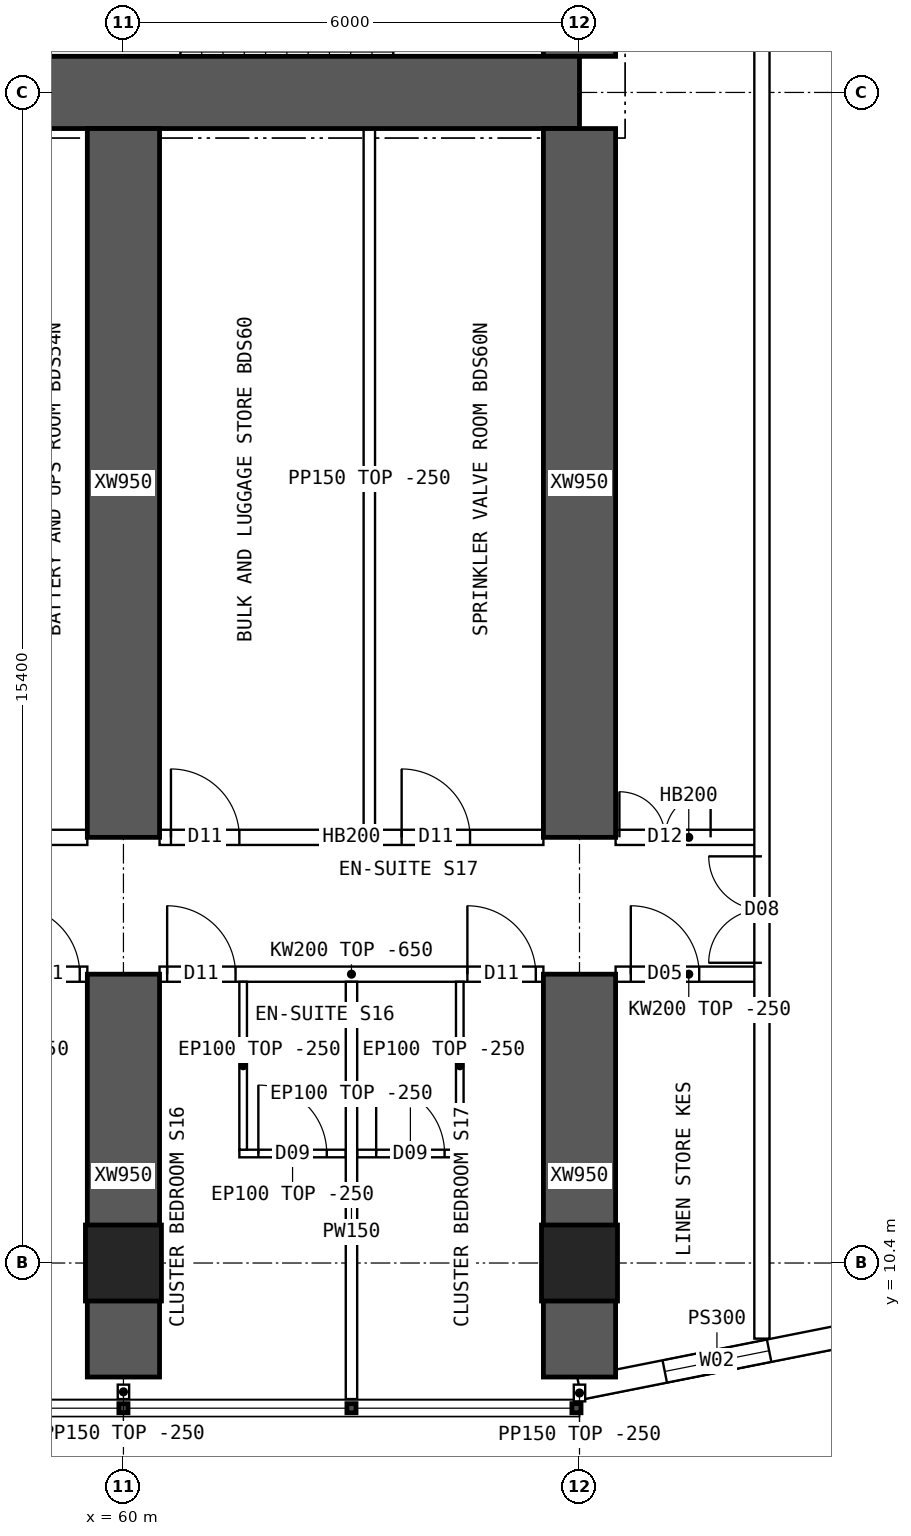
"""IFC4 building model, lengths in metres.
Left out: names, types, materials, properties, quantities, classifications, styles, units other than length and angle.
Written with IfcOpenShell. Run it as: python <this file> out.ifc"""

import sys

from ifc_helpers import new_model, si_unit, direction, frame, frame_2d, origin, origin_2d, place, context, subcontext, project, spatial, polyline, rectangle, hollow_rectangle, outline, extrude, element, fill, save


model = new_model("IFC4")
c1 = context("Model", 3, precision=1e-05, world=origin(), true_north=direction((0.0, 1.0)))
c2 = subcontext(c1, "Body", "Model", "MODEL_VIEW")
j1 = project(units=[si_unit("LENGTHUNIT", "METRE"), si_unit("PLANEANGLEUNIT", "RADIAN")], contexts=[c1])
p1 = place(None, origin())
s1 = spatial("IfcSite", under=j1, at=p1, CompositionType="ELEMENT")
p2 = place(p1, origin())
s2 = spatial("IfcBuilding", under=s1, at=p2, CompositionType="ELEMENT")
p3 = place(p2, frame((0.0, 0.0, 99.4)))
s3 = spatial("IfcBuildingStorey", under=s2, at=p3, CompositionType="ELEMENT", Elevation=99.4)
for number, where, z_axis, x_axis in (
    (1, (60.0, 10.4, 0.0), (0.0, 0.0, 1.0), (1.0, 0.0, 0.0)),
    (2, (66.0, 10.4, 0.0), (0.0, 0.0, 1.0), (1.0, 0.0, 0.0)),
):
    element("IfcColumn", number, at=place(p3, frame(where, z_axis=z_axis, x_axis=x_axis)), inside=s3, PredefinedType="COLUMN", context=c2, shape_type="SweptSolid", body=[
        extrude(hollow_rectangle(XDim=1.0, YDim=1.0, WallThickness=0.1, at=origin_2d()), origin(), (0.0, 0.0, 1.0), 3.75),
    ])
p4 = place(p3, frame((18.0, 25.8, 0.0), z_axis=(0.0, 0.0, 1.0), x_axis=(1.0, 0.0, 0.0)))
e3 = element("IfcWall", 3, at=p4, inside=s3, PredefinedType="SHEAR", context=c2, shape_type="SweptSolid", body=[
    extrude(rectangle(XDim=48.0, YDim=0.95, at=frame_2d((24.0, 0.0))), origin(), (0.0, 0.0, 1.0), 3.75),
])
p5 = place(p3, frame((66.0, 26.275, 0.0), z_axis=(0.0, 0.0, 1.0), x_axis=(0.0, 1.0, 0.0)))
e4 = element("IfcWall", 4, at=p5, inside=s3, PredefinedType="SHEAR", context=c2, shape_type="SweptSolid", body=[
    extrude(rectangle(XDim=11.45, YDim=0.95, at=frame_2d((5.725, 0.0))), origin(), (0.0, 0.0, 1.0), 3.75),
])
p6 = place(p5, frame((5.025, 0.0, 0.0)))
e5 = element("IfcOpeningElement", 5, at=p6, cuts=e4, PredefinedType="OPENING", context=c2, shape_type="SweptSolid", body=[
    extrude(rectangle(XDim=1.2, YDim=2.1, at=frame_2d((0.6, 1.05))), frame((0.0, 0.485, 0.0), z_axis=(0.0, -1.0, 0.0), x_axis=(1.0, 0.0, 0.0)), (0.0, 0.0, 1.0), 0.97),
])
p7 = place(p3, frame((60.0, 8.9, 0.0), z_axis=(0.0, 0.0, 1.0), x_axis=(0.0, 1.0, 0.0)))
e6 = element("IfcWall", 6, at=p7, inside=s3, PredefinedType="SHEAR", context=c2, shape_type="SweptSolid", body=[
    extrude(rectangle(XDim=5.3, YDim=0.95, at=frame_2d((2.65, 0.0))), origin(), (0.0, 0.0, 1.0), 3.75),
])
p8 = place(p3, frame((60.0, 16.0, 0.0), z_axis=(0.0, 0.0, 1.0), x_axis=(0.0, 1.0, 0.0)))
e7 = element("IfcWall", 7, at=p8, inside=s3, PredefinedType="SHEAR", context=c2, shape_type="SweptSolid", body=[
    extrude(rectangle(XDim=9.325, YDim=0.95, at=frame_2d((4.663, 0.0))), origin(), (0.0, 0.0, 1.0), 3.75),
])
p9 = place(p3, frame((66.0, 8.9, 0.0), z_axis=(0.0, 0.0, 1.0), x_axis=(0.0, 1.0, 0.0)))
e8 = element("IfcWall", 8, at=p9, inside=s3, PredefinedType="SHEAR", context=c2, shape_type="SweptSolid", body=[
    extrude(rectangle(XDim=5.3, YDim=0.95, at=frame_2d((2.65, 0.0))), origin(), (0.0, 0.0, 1.0), 3.75),
])
p10 = place(p3, frame((66.0, 16.0, 0.0), z_axis=(0.0, 0.0, 1.0), x_axis=(0.0, 1.0, 0.0)))
e9 = element("IfcWall", 9, at=p10, inside=s3, PredefinedType="SHEAR", context=c2, shape_type="SweptSolid", body=[
    extrude(rectangle(XDim=9.325, YDim=0.95, at=frame_2d((4.663, 0.0))), origin(), (0.0, 0.0, 1.0), 3.75),
])
p11 = place(p3, frame((66.0, 8.75, 0.0), z_axis=(0.0, 0.0, 1.0), x_axis=(0.980791473772, 0.195059183267, 0.0)))
e10 = element("IfcWall", 10, at=p11, inside=s3, PredefinedType="SOLIDWALL", context=c2, shape_type="SweptSolid", body=[
    extrude(outline(polyline([(-0.03, -0.15), (3.717, -0.15), (3.657, 0.15), (0.03, 0.15), (-0.03, -0.15)])), origin(), (0.0, 0.0, 1.0), 3.5),
])
p12 = place(p11, frame((1.144, 0.0, 0.9)))
e11 = element("IfcOpeningElement", 11, at=p12, cuts=e10, PredefinedType="OPENING", context=c2, shape_type="SweptSolid", body=[
    extrude(rectangle(XDim=1.4, YDim=1.8, at=frame_2d((0.7, 0.9))), frame((0.0, 0.16, 0.0), z_axis=(0.0, -1.0, 0.0), x_axis=(1.0, 0.0, 0.0)), (0.0, 0.0, 1.0), 0.32),
])
p13 = place(p3, frame((54.475, 14.2, 0.0), z_axis=(0.0, 0.0, 1.0), x_axis=(1.0, 0.0, 0.0)))
e12 = element("IfcWall", 12, at=p13, inside=s3, PredefinedType="SOLIDWALL", context=c2, shape_type="SweptSolid", body=[
    extrude(outline(polyline([(0.0, 0.0), (5.05, 0.0), (5.05, 3.1), (0.0, 3.1), (0.0, 0.0)])), frame((0.0, 0.1, 0.0), z_axis=(0.0, -1.0, 0.0), x_axis=(1.0, 0.0, 0.0)), (0.0, 0.0, 1.0), 0.2),
])
p14 = place(p13, frame((0.1, 0.0, 0.0)))
e13 = element("IfcOpeningElement", 13, at=p14, cuts=e12, PredefinedType="OPENING", context=c2, shape_type="SweptSolid", body=[
    extrude(rectangle(XDim=0.9, YDim=2.1, at=frame_2d((0.45, 1.05))), frame((0.0, 0.11, 0.0), z_axis=(0.0, -1.0, 0.0), x_axis=(1.0, 0.0, 0.0)), (0.0, 0.0, 1.0), 0.22),
])
p15 = place(p13, frame((4.05, 0.0, 0.0)))
e14 = element("IfcOpeningElement", 14, at=p15, cuts=e12, PredefinedType="OPENING", context=c2, shape_type="SweptSolid", body=[
    extrude(rectangle(XDim=0.9, YDim=2.1, at=frame_2d((0.45, 1.05))), frame((0.0, 0.11, 0.0), z_axis=(0.0, -1.0, 0.0), x_axis=(1.0, 0.0, 0.0)), (0.0, 0.0, 1.0), 0.22),
])
p16 = place(p3, frame((54.475, 16.0, 0.0), z_axis=(0.0, 0.0, 1.0), x_axis=(1.0, 0.0, 0.0)))
e15 = element("IfcWall", 15, at=p16, inside=s3, PredefinedType="SOLIDWALL", context=c2, shape_type="SweptSolid", body=[
    extrude(rectangle(XDim=5.05, YDim=0.2, at=frame_2d((2.525, 0.0))), origin(), (0.0, 0.0, 1.0), 3.5),
])
p17 = place(p16, frame((0.35, 0.0, 0.0)))
e16 = element("IfcOpeningElement", 16, at=p17, cuts=e15, PredefinedType="OPENING", context=c2, shape_type="SweptSolid", body=[
    extrude(rectangle(XDim=0.9, YDim=2.1, at=frame_2d((0.45, 1.05))), frame((0.0, 0.11, 0.0), z_axis=(0.0, -1.0, 0.0), x_axis=(1.0, 0.0, 0.0)), (0.0, 0.0, 1.0), 0.22),
])
p18 = place(p16, frame((3.565, 0.0, 0.0)))
e17 = element("IfcOpeningElement", 17, at=p18, cuts=e15, PredefinedType="OPENING", context=c2, shape_type="SweptSolid", body=[
    extrude(rectangle(XDim=0.9, YDim=2.1, at=frame_2d((0.45, 1.05))), frame((0.0, 0.11, 0.0), z_axis=(0.0, -1.0, 0.0), x_axis=(1.0, 0.0, 0.0)), (0.0, 0.0, 1.0), 0.22),
])
p19 = place(p3, frame((60.475, 14.2, 0.0), z_axis=(0.0, 0.0, 1.0), x_axis=(1.0, 0.0, 0.0)))
e18 = element("IfcWall", 18, at=p19, inside=s3, PredefinedType="SOLIDWALL", context=c2, shape_type="SweptSolid", body=[
    extrude(outline(polyline([(0.0, 0.0), (5.05, 0.0), (5.05, 3.1), (0.0, 3.1), (0.0, 0.0)])), frame((0.0, 0.1, 0.0), z_axis=(0.0, -1.0, 0.0), x_axis=(1.0, 0.0, 0.0)), (0.0, 0.0, 1.0), 0.2),
])
p20 = place(p19, frame((0.1, 0.0, 0.0)))
e19 = element("IfcOpeningElement", 19, at=p20, cuts=e18, PredefinedType="OPENING", context=c2, shape_type="SweptSolid", body=[
    extrude(rectangle(XDim=0.9, YDim=2.1, at=frame_2d((0.45, 1.05))), frame((0.0, 0.11, 0.0), z_axis=(0.0, -1.0, 0.0), x_axis=(1.0, 0.0, 0.0)), (0.0, 0.0, 1.0), 0.22),
])
p21 = place(p19, frame((4.05, 0.0, 0.0)))
e20 = element("IfcOpeningElement", 20, at=p21, cuts=e18, PredefinedType="OPENING", context=c2, shape_type="SweptSolid", body=[
    extrude(rectangle(XDim=0.9, YDim=2.1, at=frame_2d((0.45, 1.05))), frame((0.0, 0.11, 0.0), z_axis=(0.0, -1.0, 0.0), x_axis=(1.0, 0.0, 0.0)), (0.0, 0.0, 1.0), 0.22),
])
p22 = place(p3, frame((60.475, 16.0, 0.0), z_axis=(0.0, 0.0, 1.0), x_axis=(1.0, 0.0, 0.0)))
e21 = element("IfcWall", 21, at=p22, inside=s3, PredefinedType="SOLIDWALL", context=c2, shape_type="SweptSolid", body=[
    extrude(rectangle(XDim=5.05, YDim=0.2, at=frame_2d((2.525, 0.0))), origin(), (0.0, 0.0, 1.0), 3.5),
])
p23 = place(p22, frame((0.15, 0.0, 0.0)))
e22 = element("IfcOpeningElement", 22, at=p23, cuts=e21, PredefinedType="OPENING", context=c2, shape_type="SweptSolid", body=[
    extrude(rectangle(XDim=0.9, YDim=2.1, at=frame_2d((0.45, 1.05))), frame((0.0, 0.11, 0.0), z_axis=(0.0, -1.0, 0.0), x_axis=(1.0, 0.0, 0.0)), (0.0, 0.0, 1.0), 0.22),
])
p24 = place(p22, frame((3.185, 0.0, 0.0)))
e23 = element("IfcOpeningElement", 23, at=p24, cuts=e21, PredefinedType="OPENING", context=c2, shape_type="SweptSolid", body=[
    extrude(rectangle(XDim=0.9, YDim=2.1, at=frame_2d((0.45, 1.05))), frame((0.0, 0.11, 0.0), z_axis=(0.0, -1.0, 0.0), x_axis=(1.0, 0.0, 0.0)), (0.0, 0.0, 1.0), 0.22),
])
p25 = place(p3, frame((66.475, 14.2, 0.0), z_axis=(0.0, 0.0, 1.0), x_axis=(1.0, 0.0, 0.0)))
e24 = element("IfcWall", 24, at=p25, inside=s3, PredefinedType="SOLIDWALL", context=c2, shape_type="SweptSolid", body=[
    extrude(rectangle(XDim=1.925, YDim=0.2, at=frame_2d((0.962, 0.0))), origin(), (0.0, 0.0, 1.0), 3.5),
])
p26 = place(p25, frame((0.2, 0.0, 0.0)))
e25 = element("IfcOpeningElement", 25, at=p26, cuts=e24, PredefinedType="OPENING", context=c2, shape_type="SweptSolid", body=[
    extrude(rectangle(XDim=0.9, YDim=2.1, at=frame_2d((0.45, 1.05))), frame((0.0, 0.11, 0.0), z_axis=(0.0, -1.0, 0.0), x_axis=(1.0, 0.0, 0.0)), (0.0, 0.0, 1.0), 0.22),
])
p27 = place(p3, frame((66.475, 16.0, 0.0), z_axis=(0.0, 0.0, 1.0), x_axis=(1.0, 0.0, 0.0)))
e26 = element("IfcWall", 26, at=p27, inside=s3, PredefinedType="SOLIDWALL", context=c2, shape_type="SweptSolid", body=[
    extrude(rectangle(XDim=1.925, YDim=0.2, at=frame_2d((0.962, 0.0))), origin(), (0.0, 0.0, 1.0), 3.5),
])
p28 = place(p27, frame((0.05, 0.0, 0.0)))
e27 = element("IfcOpeningElement", 27, at=p28, cuts=e26, PredefinedType="OPENING", context=c2, shape_type="SweptSolid", body=[
    extrude(rectangle(XDim=1.2, YDim=2.1, at=frame_2d((0.6, 1.05))), frame((0.0, 0.11, 0.0), z_axis=(0.0, -1.0, 0.0), x_axis=(1.0, 0.0, 0.0)), (0.0, 0.0, 1.0), 0.22),
])
p29 = place(p3, frame((63.0, 8.61, 0.0), z_axis=(0.0, 0.0, 1.0), x_axis=(0.0, 1.0, 0.0)))
e28 = element("IfcWall", 28, at=p29, inside=s3, PredefinedType="PARTITIONING", context=c2, shape_type="SweptSolid", body=[
    extrude(outline(polyline([(0.0, 0.0), (5.49, 0.0), (5.49, 3.1), (5.442, 3.1), (5.44, 3.5), (1.992, 3.5), (1.99, 3.1), (1.592, 3.1), (1.59, 3.5), (0.0, 3.5), (0.0, 0.0)])), frame((0.0, 0.075, 0.0), z_axis=(0.0, -1.0, 0.0), x_axis=(1.0, 0.0, 0.0)), (0.0, 0.0, 1.0), 0.15),
])
p30 = place(p3, frame((62.925, 11.841, 0.0), z_axis=(0.0, 0.0, 1.0), x_axis=(-1.0, 0.0, 0.0)))
e29 = element("IfcWall", 29, at=p30, inside=s3, PredefinedType="PARTITIONING", context=c2, shape_type="SweptSolid", body=[
    extrude(rectangle(XDim=1.4, YDim=0.1, at=frame_2d((0.7, 0.0))), origin(), (0.0, 0.0, 1.0), 3.5),
])
p31 = place(p30, frame((0.25, 0.0, 0.0)))
e30 = element("IfcOpeningElement", 30, at=p31, cuts=e29, PredefinedType="OPENING", context=c2, shape_type="SweptSolid", body=[
    extrude(rectangle(XDim=0.9, YDim=2.1, at=frame_2d((0.45, 1.05))), frame((0.0, 0.06, 0.0), z_axis=(0.0, -1.0, 0.0), x_axis=(1.0, 0.0, 0.0)), (0.0, 0.0, 1.0), 0.12),
])
p32 = place(p3, frame((61.575, 11.891, 0.0), z_axis=(0.0, 0.0, 1.0), x_axis=(0.0, 1.0, 0.0)))
e31 = element("IfcWall", 31, at=p32, inside=s3, PredefinedType="PARTITIONING", context=c2, shape_type="SweptSolid", body=[
    extrude(outline(polyline([(0.0, 0.0), (2.209, 0.0), (2.209, 3.1), (2.161, 3.1), (2.159, 3.5), (0.0, 3.5), (0.0, 0.0)])), frame((0.0, 0.05, 0.0), z_axis=(0.0, -1.0, 0.0), x_axis=(1.0, 0.0, 0.0)), (0.0, 0.0, 1.0), 0.1),
])
p33 = place(p3, frame((64.475, 11.841, 0.0), z_axis=(0.0, 0.0, 1.0), x_axis=(-1.0, 0.0, 0.0)))
e32 = element("IfcWall", 32, at=p33, inside=s3, PredefinedType="PARTITIONING", context=c2, shape_type="SweptSolid", body=[
    extrude(rectangle(XDim=1.4, YDim=0.1, at=frame_2d((0.7, 0.0))), origin(), (0.0, 0.0, 1.0), 3.5),
])
p34 = place(p33, frame((0.25, 0.0, 0.0)))
e33 = element("IfcOpeningElement", 33, at=p34, cuts=e32, PredefinedType="OPENING", context=c2, shape_type="SweptSolid", body=[
    extrude(rectangle(XDim=0.9, YDim=2.1, at=frame_2d((0.45, 1.05))), frame((0.0, 0.06, 0.0), z_axis=(0.0, -1.0, 0.0), x_axis=(1.0, 0.0, 0.0)), (0.0, 0.0, 1.0), 0.12),
])
p35 = place(p3, frame((64.425, 11.891, 0.0), z_axis=(0.0, 0.0, 1.0), x_axis=(0.0, 1.0, 0.0)))
e34 = element("IfcWall", 34, at=p35, inside=s3, PredefinedType="PARTITIONING", context=c2, shape_type="SweptSolid", body=[
    extrude(outline(polyline([(0.0, 0.0), (2.209, 0.0), (2.209, 3.1), (2.161, 3.1), (2.159, 3.5), (0.0, 3.5), (0.0, 0.0)])), frame((0.0, 0.05, 0.0), z_axis=(0.0, -1.0, 0.0), x_axis=(1.0, 0.0, 0.0)), (0.0, 0.0, 1.0), 0.1),
])
p36 = place(p3, frame((63.235, 16.1, 0.0), z_axis=(0.0, 0.0, 1.0), x_axis=(0.0, 1.0, 0.0)))
e35 = element("IfcWall", 35, at=p36, inside=s3, PredefinedType="PARTITIONING", context=c2, shape_type="SweptSolid", body=[
    extrude(rectangle(XDim=9.225, YDim=0.15, at=frame_2d((4.612, 0.0))), origin(), (0.0, 0.0, 1.0), 3.5),
])
p37 = place(p3, frame((68.4, 9.405, 0.0), z_axis=(0.0, 0.0, 1.0), x_axis=(0.0, 1.0, 0.0)))
e36 = element("IfcWall", 36, at=p37, inside=s3, PredefinedType="SOLIDWALL", context=c2, shape_type="SweptSolid", body=[
    extrude(rectangle(XDim=45.189, YDim=0.2, at=frame_2d((22.595, 0.0))), origin(), (0.0, 0.0, 1.0), 3.5),
])
p38 = place(p37, frame((18.395, 0.0, 0.0)))
e37 = element("IfcOpeningElement", 37, at=p38, cuts=e36, PredefinedType="OPENING", context=c2, shape_type="SweptSolid", body=[
    extrude(rectangle(XDim=1.2, YDim=2.1, at=frame_2d((0.6, 1.05))), frame((0.0, 0.11, 0.0), z_axis=(0.0, -1.0, 0.0), x_axis=(1.0, 0.0, 0.0)), (0.0, 0.0, 1.0), 0.22),
])
p39 = place(p37, frame((30.195, 0.0, 0.0)))
e38 = element("IfcOpeningElement", 38, at=p39, cuts=e36, PredefinedType="OPENING", context=c2, shape_type="SweptSolid", body=[
    extrude(rectangle(XDim=1.2, YDim=2.1, at=frame_2d((0.6, 1.05))), frame((0.0, 0.11, 0.0), z_axis=(0.0, -1.0, 0.0), x_axis=(1.0, 0.0, 0.0)), (0.0, 0.0, 1.0), 0.22),
])
p40 = place(p37, frame((4.945, 0.0, 0.0)))
e39 = element("IfcOpeningElement", 39, at=p40, cuts=e36, PredefinedType="OPENING", context=c2, shape_type="SweptSolid", body=[
    extrude(rectangle(XDim=1.4, YDim=2.1, at=frame_2d((0.7, 1.05))), frame((0.0, 0.11, 0.0), z_axis=(0.0, -1.0, 0.0), x_axis=(1.0, 0.0, 0.0)), (0.0, 0.0, 1.0), 0.22),
])
p41 = place(p37, frame((38.745, 0.0, 0.0)))
e40 = element("IfcOpeningElement", 40, at=p41, cuts=e36, PredefinedType="OPENING", context=c2, shape_type="SweptSolid", body=[
    extrude(rectangle(XDim=1.4, YDim=2.1, at=frame_2d((0.7, 1.05))), frame((0.0, 0.11, 0.0), z_axis=(0.0, -1.0, 0.0), x_axis=(1.0, 0.0, 0.0)), (0.0, 0.0, 1.0), 0.22),
])
p42 = place(p3, frame((60.0, 8.8, 0.0), z_axis=(0.0, 0.0, 1.0), x_axis=(0.0, -1.0, 0.0)))
e41 = element("IfcWall", 41, at=p42, inside=s3, PredefinedType="PARTITIONING", context=c2, shape_type="SweptSolid", body=[
    extrude(rectangle(XDim=0.19, YDim=0.15, at=frame_2d((0.095, 0.0))), origin(), (0.0, 0.0, 1.0), 3.5),
])
p43 = place(p3, frame((66.0, 8.8, 0.0), z_axis=(0.0, 0.0, 1.0), x_axis=(0.0, -1.0, 0.0)))
e42 = element("IfcWall", 42, at=p43, inside=s3, PredefinedType="PARTITIONING", context=c2, shape_type="SweptSolid", body=[
    extrude(rectangle(XDim=0.22, YDim=0.15, at=frame_2d((0.11, 0.0))), origin(), (0.0, 0.0, 1.0), 3.5),
])
p44 = place(p12, origin())
e43 = element("IfcWindow", 43, at=p44, inside=s3, PartitioningType="SINGLE_PANEL", PredefinedType="WINDOW", context=c2, shape_type="SweptSolid", body=[
    extrude(rectangle(XDim=1.4, YDim=1.8, at=frame_2d((0.7, 0.9))), frame((0.0, 0.03, 0.0), z_axis=(0.0, -1.0, 0.0), x_axis=(1.0, 0.0, 0.0)), (0.0, 0.0, 1.0), 0.06),
])
fill(e11, e43)
p45 = place(p28, origin())
e44 = element("IfcDoor", 44, at=p45, inside=s3, OperationType="DOUBLE_DOOR_SINGLE_SWING", PredefinedType="DOOR", context=c2, shape_type="SweptSolid", body=[
    extrude(rectangle(XDim=1.2, YDim=2.1, at=frame_2d((0.6, 1.05))), frame((0.0, 0.025, 0.0), z_axis=(0.0, -1.0, 0.0), x_axis=(1.0, 0.0, 0.0)), (0.0, 0.0, 1.0), 0.05),
])
fill(e27, e44)
p46 = place(p15, origin())
e45 = element("IfcDoor", 45, at=p46, inside=s3, OperationType="SINGLE_SWING_LEFT", PredefinedType="DOOR", context=c2, shape_type="SweptSolid", body=[
    extrude(rectangle(XDim=0.9, YDim=2.1, at=frame_2d((0.45, 1.05))), frame((0.0, 0.025, 0.0), z_axis=(0.0, -1.0, 0.0), x_axis=(1.0, 0.0, 0.0)), (0.0, 0.0, 1.0), 0.05),
])
fill(e14, e45)
p47 = place(p31, origin())
e46 = element("IfcDoor", 46, at=p47, inside=s3, OperationType="SINGLE_SWING_RIGHT", PredefinedType="DOOR", context=c2, shape_type="SweptSolid", body=[
    extrude(rectangle(XDim=0.9, YDim=2.1, at=frame_2d((0.45, 1.05))), frame((0.0, 0.025, 0.0), z_axis=(0.0, -1.0, 0.0), x_axis=(1.0, 0.0, 0.0)), (0.0, 0.0, 1.0), 0.05),
])
fill(e30, e46)
p48 = place(p20, origin())
e47 = element("IfcDoor", 47, at=p48, inside=s3, OperationType="SINGLE_SWING_LEFT", PredefinedType="DOOR", context=c2, shape_type="SweptSolid", body=[
    extrude(rectangle(XDim=0.9, YDim=2.1, at=frame_2d((0.45, 1.05))), frame((0.0, 0.025, 0.0), z_axis=(0.0, -1.0, 0.0), x_axis=(1.0, 0.0, 0.0)), (0.0, 0.0, 1.0), 0.05),
])
fill(e19, e47)
p49 = place(p34, origin())
e48 = element("IfcDoor", 48, at=p49, inside=s3, OperationType="SINGLE_SWING_RIGHT", PredefinedType="DOOR", context=c2, shape_type="SweptSolid", body=[
    extrude(rectangle(XDim=0.9, YDim=2.1, at=frame_2d((0.45, 1.05))), frame((0.0, 0.025, 0.0), z_axis=(0.0, -1.0, 0.0), x_axis=(1.0, 0.0, 0.0)), (0.0, 0.0, 1.0), 0.05),
])
fill(e33, e48)
p50 = place(p21, origin())
e49 = element("IfcDoor", 49, at=p50, inside=s3, OperationType="SINGLE_SWING_LEFT", PredefinedType="DOOR", context=c2, shape_type="SweptSolid", body=[
    extrude(rectangle(XDim=0.9, YDim=2.1, at=frame_2d((0.45, 1.05))), frame((0.0, 0.025, 0.0), z_axis=(0.0, -1.0, 0.0), x_axis=(1.0, 0.0, 0.0)), (0.0, 0.0, 1.0), 0.05),
])
fill(e20, e49)
p51 = place(p23, origin())
e50 = element("IfcDoor", 50, at=p51, inside=s3, OperationType="SINGLE_SWING_LEFT", PredefinedType="DOOR", context=c2, shape_type="SweptSolid", body=[
    extrude(rectangle(XDim=0.9, YDim=2.1, at=frame_2d((0.45, 1.05))), frame((0.0, 0.025, 0.0), z_axis=(0.0, -1.0, 0.0), x_axis=(1.0, 0.0, 0.0)), (0.0, 0.0, 1.0), 0.05),
])
fill(e22, e50)
p52 = place(p24, origin())
e51 = element("IfcDoor", 51, at=p52, inside=s3, OperationType="SINGLE_SWING_LEFT", PredefinedType="DOOR", context=c2, shape_type="SweptSolid", body=[
    extrude(rectangle(XDim=0.9, YDim=2.1, at=frame_2d((0.45, 1.05))), frame((0.0, 0.025, 0.0), z_axis=(0.0, -1.0, 0.0), x_axis=(1.0, 0.0, 0.0)), (0.0, 0.0, 1.0), 0.05),
])
fill(e23, e51)
p53 = place(p40, origin())
e52 = element("IfcDoor", 52, at=p53, inside=s3, OperationType="DOUBLE_DOOR_SINGLE_SWING", PredefinedType="DOOR", context=c2, shape_type="SweptSolid", body=[
    extrude(rectangle(XDim=1.4, YDim=2.1, at=frame_2d((0.7, 1.05))), frame((0.0, 0.025, 0.0), z_axis=(0.0, -1.0, 0.0), x_axis=(1.0, 0.0, 0.0)), (0.0, 0.0, 1.0), 0.05),
])
fill(e39, e52)
p54 = place(p26, origin())
e53 = element("IfcDoor", 53, at=p54, inside=s3, OperationType="SINGLE_SWING_LEFT", PredefinedType="DOOR", context=c2, shape_type="SweptSolid", body=[
    extrude(rectangle(XDim=0.9, YDim=2.1, at=frame_2d((0.45, 1.05))), frame((0.0, 0.025, 0.0), z_axis=(0.0, -1.0, 0.0), x_axis=(1.0, 0.0, 0.0)), (0.0, 0.0, 1.0), 0.05),
])
fill(e25, e53)
save(model, sys.argv[1])
